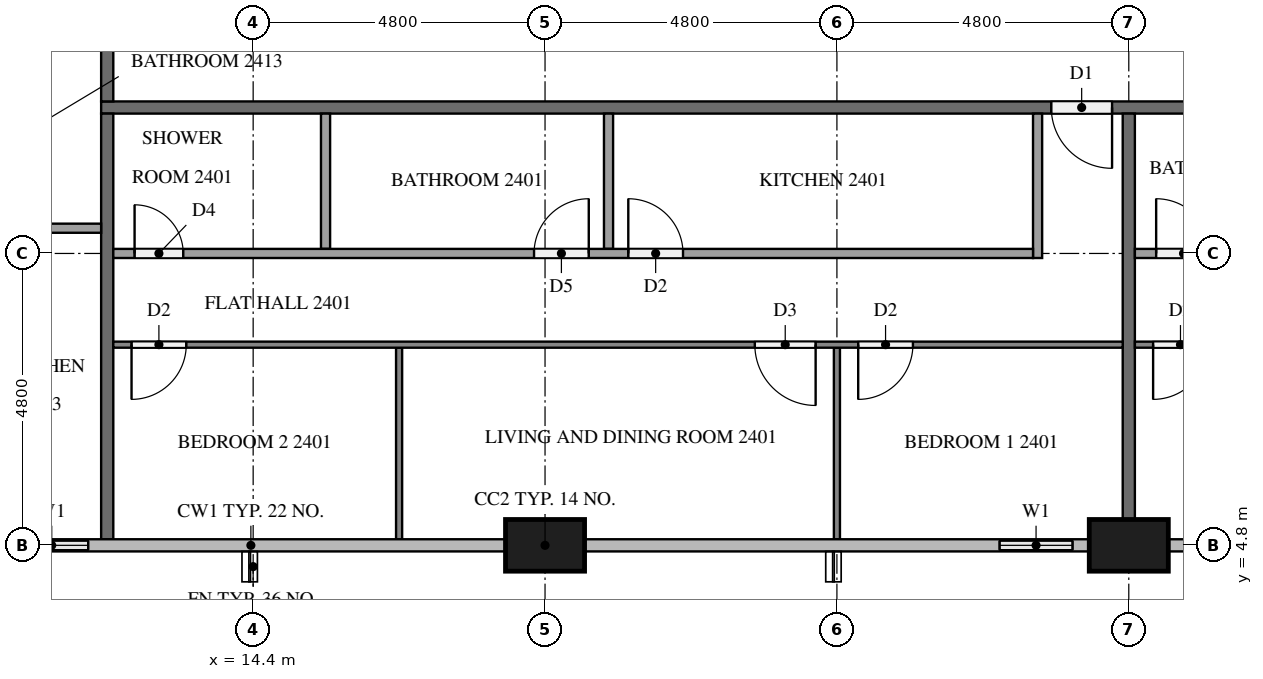
"""IFC4 building model, lengths in metres.
Left out: names, types, materials, properties, quantities, classifications, styles, units other than length and angle.
Written with IfcOpenShell. Run it as: python <this file> out.ifc"""

import sys

from ifc_helpers import new_model, si_unit, direction, frame, frame_2d, origin, origin_2d, place, context, subcontext, project, spatial, rectangle, extrude, element, fill, save


model = new_model("IFC4")
c1 = context("Model", 3, precision=1e-05, world=origin(), true_north=direction((0.0, 1.0)))
c2 = subcontext(c1, "Body", "Model", "MODEL_VIEW")
j1 = project(units=[si_unit("LENGTHUNIT", "METRE"), si_unit("PLANEANGLEUNIT", "RADIAN")], contexts=[c1])
p1 = place(None, origin())
s1 = spatial("IfcSite", under=j1, at=p1, CompositionType="ELEMENT")
p2 = place(p1, origin())
s2 = spatial("IfcBuilding", under=s1, at=p2, CompositionType="ELEMENT")
p3 = place(p2, frame((0.0, 0.0, 96.2)))
s3 = spatial("IfcBuildingStorey", under=s2, at=p3, CompositionType="ELEMENT", Elevation=96.2)
for number, where, z_axis, x_axis in (
    (1, (19.2, 4.8, 0.0), (0.0, 0.0, 1.0), (1.0, 0.0, 0.0)),
    (2, (28.8, 4.8, 0.0), (0.0, 0.0, 1.0), (1.0, 0.0, 0.0)),
):
    element("IfcColumn", number, at=place(p3, frame(where, z_axis=z_axis, x_axis=x_axis)), inside=s3, PredefinedType="COLUMN", context=c2, shape_type="SweptSolid", body=[
        extrude(rectangle(XDim=1.3, YDim=0.85, at=origin_2d()), origin(), (0.0, 0.0, 1.0), 3.2),
    ])
p4 = place(p3, frame((10.175, 4.8, 0.0), z_axis=(0.0, 0.0, 1.0), x_axis=(1.0, 0.0, 0.0)))
e3 = element("IfcWall", 3, at=p4, inside=s3, PredefinedType="SOLIDWALL", context=c2, shape_type="SweptSolid", body=[
    extrude(rectangle(XDim=1.825, YDim=0.15, at=frame_2d((0.913, 0.0))), origin(), (0.0, 0.0, 1.0), 3.2),
])
p5 = place(p4, frame((0.312, 0.0, 0.9)))
e4 = element("IfcOpeningElement", 4, at=p5, cuts=e3, PredefinedType="OPENING", context=c2, shape_type="SweptSolid", body=[
    extrude(rectangle(XDim=1.2, YDim=1.4, at=frame_2d((0.6, 0.7))), frame((0.0, 0.085, 0.0), z_axis=(0.0, -1.0, 0.0), x_axis=(1.0, 0.0, 0.0)), (0.0, 0.0, 1.0), 0.17),
])
p6 = place(p3, frame((26.4, 4.8, 0.0), z_axis=(0.0, 0.0, 1.0), x_axis=(1.0, 0.0, 0.0)))
e5 = element("IfcWall", 5, at=p6, inside=s3, PredefinedType="SOLIDWALL", context=c2, shape_type="SweptSolid", body=[
    extrude(rectangle(XDim=1.75, YDim=0.15, at=frame_2d((0.875, 0.0))), origin(), (0.0, 0.0, 1.0), 3.2),
])
p7 = place(p6, frame((0.275, 0.0, 0.9)))
e6 = element("IfcOpeningElement", 6, at=p7, cuts=e5, PredefinedType="OPENING", context=c2, shape_type="SweptSolid", body=[
    extrude(rectangle(XDim=1.2, YDim=1.4, at=frame_2d((0.6, 0.7))), frame((0.0, 0.085, 0.0), z_axis=(0.0, -1.0, 0.0), x_axis=(1.0, 0.0, 0.0)), (0.0, 0.0, 1.0), 0.17),
])
p8 = place(p3, frame((29.45, 4.8, 0.0), z_axis=(0.0, 0.0, 1.0), x_axis=(1.0, 0.0, 0.0)))
e7 = element("IfcWall", 7, at=p8, inside=s3, PredefinedType="SOLIDWALL", context=c2, shape_type="SweptSolid", body=[
    extrude(rectangle(XDim=1.75, YDim=0.15, at=frame_2d((0.875, 0.0))), origin(), (0.0, 0.0, 1.0), 3.2),
])
p9 = place(p8, frame((0.275, 0.0, 0.9)))
e8 = element("IfcOpeningElement", 8, at=p9, cuts=e7, PredefinedType="OPENING", context=c2, shape_type="SweptSolid", body=[
    extrude(rectangle(XDim=1.2, YDim=1.4, at=frame_2d((0.6, 0.7))), frame((0.0, 0.085, 0.0), z_axis=(0.0, -1.0, 0.0), x_axis=(1.0, 0.0, 0.0)), (0.0, 0.0, 1.0), 0.17),
])
p10 = place(p3, frame((50.5, 12.0, 0.0), z_axis=(0.0, 0.0, 1.0), x_axis=(-1.0, 0.0, 0.0)))
e9 = element("IfcWall", 9, at=p10, inside=s3, PredefinedType="PARTITIONING", context=c2, shape_type="SweptSolid", body=[
    extrude(rectangle(XDim=38.6, YDim=0.2, at=frame_2d((19.3, 0.0))), origin(), (0.0, 0.0, 1.0), 3.2),
])
p11 = place(p10, frame((21.975, 0.0, 0.0)))
e10 = element("IfcOpeningElement", 10, at=p11, cuts=e9, PredefinedType="OPENING", context=c2, shape_type="SweptSolid", body=[
    extrude(rectangle(XDim=1.0, YDim=2.1, at=frame_2d((0.5, 1.05))), frame((0.0, 0.11, 0.0), z_axis=(0.0, -1.0, 0.0), x_axis=(1.0, 0.0, 0.0)), (0.0, 0.0, 1.0), 0.22),
])
p12 = place(p10, frame((7.575, 0.0, 0.0)))
e11 = element("IfcOpeningElement", 11, at=p12, cuts=e9, PredefinedType="OPENING", context=c2, shape_type="SweptSolid", body=[
    extrude(rectangle(XDim=1.0, YDim=2.1, at=frame_2d((0.5, 1.05))), frame((0.0, 0.11, 0.0), z_axis=(0.0, -1.0, 0.0), x_axis=(1.0, 0.0, 0.0)), (0.0, 0.0, 1.0), 0.22),
])
p13 = place(p10, frame((0.375, 0.0, 0.0)))
e12 = element("IfcOpeningElement", 12, at=p13, cuts=e9, PredefinedType="OPENING", context=c2, shape_type="SweptSolid", body=[
    extrude(rectangle(XDim=1.0, YDim=2.1, at=frame_2d((0.5, 1.05))), frame((0.0, 0.11, 0.0), z_axis=(0.0, -1.0, 0.0), x_axis=(1.0, 0.0, 0.0)), (0.0, 0.0, 1.0), 0.22),
])
p14 = place(p3, frame((12.0, 12.1, 0.0), z_axis=(0.0, 0.0, 1.0), x_axis=(0.0, 1.0, 0.0)))
e13 = element("IfcWall", 13, at=p14, inside=s3, PredefinedType="PARTITIONING", context=c2, shape_type="SweptSolid", body=[
    extrude(rectangle(XDim=2.8, YDim=0.2, at=frame_2d((1.4, 0.0))), origin(), (0.0, 0.0, 1.0), 3.2),
])
p15 = place(p14, frame((1.625, 0.0, 0.0)))
e14 = element("IfcOpeningElement", 14, at=p15, cuts=e13, PredefinedType="OPENING", context=c2, shape_type="SweptSolid", body=[
    extrude(rectangle(XDim=1.0, YDim=2.1, at=frame_2d((0.5, 1.05))), frame((0.0, 0.11, 0.0), z_axis=(0.0, -1.0, 0.0), x_axis=(1.0, 0.0, 0.0)), (0.0, 0.0, 1.0), 0.22),
])
p16 = place(p3, frame((28.8, 11.9, 0.0), z_axis=(0.0, 0.0, 1.0), x_axis=(0.0, -1.0, 0.0)))
e15 = element("IfcWall", 15, at=p16, inside=s3, PredefinedType="PARTITIONING", context=c2, shape_type="SweptSolid", body=[
    extrude(rectangle(XDim=6.675, YDim=0.2, at=frame_2d((3.337, 0.0))), origin(), (0.0, 0.0, 1.0), 3.2),
])
p17 = place(p3, frame((12.0, 4.9, 0.0), z_axis=(0.0, 0.0, 1.0), x_axis=(0.0, 1.0, 0.0)))
e16 = element("IfcWall", 16, at=p17, inside=s3, PredefinedType="PARTITIONING", context=c2, shape_type="SweptSolid", body=[
    extrude(rectangle(XDim=7.0, YDim=0.2, at=frame_2d((3.5, 0.0))), origin(), (0.0, 0.0, 1.0), 3.2),
])
for number, where, z_axis, x_axis in (
    (17, (24.0, 8.05, 0.0), (0.0, 0.0, 1.0), (0.0, -1.0, 0.0)),
    (18, (16.8, 8.05, 0.0), (0.0, 0.0, 1.0), (0.0, -1.0, 0.0)),
):
    element("IfcWall", number, at=place(p3, frame(where, z_axis=z_axis, x_axis=x_axis)), inside=s3, PredefinedType="PARTITIONING", context=c2, shape_type="SweptSolid", body=[
        extrude(rectangle(XDim=3.15, YDim=0.1, at=frame_2d((1.575, 0.0))), origin(), (0.0, 0.0, 1.0), 3.2),
    ])
p18 = place(p3, frame((28.7, 8.1, 0.0), z_axis=(0.0, 0.0, 1.0), x_axis=(-1.0, 0.0, 0.0)))
e19 = element("IfcWall", 19, at=p18, inside=s3, PredefinedType="PARTITIONING", context=c2, shape_type="SweptSolid", body=[
    extrude(rectangle(XDim=16.6, YDim=0.1, at=frame_2d((8.3, 0.0))), origin(), (0.0, 0.0, 1.0), 3.2),
])
p19 = place(p18, frame((3.45, 0.0, 0.0)))
e20 = element("IfcOpeningElement", 20, at=p19, cuts=e19, PredefinedType="OPENING", context=c2, shape_type="SweptSolid", body=[
    extrude(rectangle(XDim=0.9, YDim=2.1, at=frame_2d((0.45, 1.05))), frame((0.0, 0.06, 0.0), z_axis=(0.0, -1.0, 0.0), x_axis=(1.0, 0.0, 0.0)), (0.0, 0.0, 1.0), 0.12),
])
p20 = place(p18, frame((5.05, 0.0, 0.0)))
e21 = element("IfcOpeningElement", 21, at=p20, cuts=e19, PredefinedType="OPENING", context=c2, shape_type="SweptSolid", body=[
    extrude(rectangle(XDim=1.0, YDim=2.1, at=frame_2d((0.5, 1.05))), frame((0.0, 0.06, 0.0), z_axis=(0.0, -1.0, 0.0), x_axis=(1.0, 0.0, 0.0)), (0.0, 0.0, 1.0), 0.12),
])
p21 = place(p18, frame((15.4, 0.0, 0.0)))
e22 = element("IfcOpeningElement", 22, at=p21, cuts=e19, PredefinedType="OPENING", context=c2, shape_type="SweptSolid", body=[
    extrude(rectangle(XDim=0.9, YDim=2.1, at=frame_2d((0.45, 1.05))), frame((0.0, 0.06, 0.0), z_axis=(0.0, -1.0, 0.0), x_axis=(1.0, 0.0, 0.0)), (0.0, 0.0, 1.0), 0.12),
])
for number, where, z_axis, x_axis in (
    (23, (20.244, 11.9, 0.0), (0.0, 0.0, 1.0), (0.0, -1.0, 0.0)),
    (24, (15.59, 11.9, 0.0), (0.0, 0.0, 1.0), (0.0, -1.0, 0.0)),
):
    element("IfcWall", number, at=place(p3, frame(where, z_axis=z_axis, x_axis=x_axis)), inside=s3, PredefinedType="PARTITIONING", context=c2, shape_type="SweptSolid", body=[
        extrude(rectangle(XDim=2.225, YDim=0.15, at=frame_2d((1.112, 0.0))), origin(), (0.0, 0.0, 1.0), 3.2),
    ])
p22 = place(p3, frame((27.3, 11.9, 0.0), z_axis=(0.0, 0.0, 1.0), x_axis=(0.0, -1.0, 0.0)))
e25 = element("IfcWall", 25, at=p22, inside=s3, PredefinedType="PARTITIONING", context=c2, shape_type="SweptSolid", body=[
    extrude(rectangle(XDim=2.375, YDim=0.15, at=frame_2d((1.188, 0.0))), origin(), (0.0, 0.0, 1.0), 3.2),
])
p23 = place(p3, frame((12.1, 9.6, 0.0), z_axis=(0.0, 0.0, 1.0), x_axis=(1.0, 0.0, 0.0)))
e26 = element("IfcWall", 26, at=p23, inside=s3, PredefinedType="PARTITIONING", context=c2, shape_type="SweptSolid", body=[
    extrude(rectangle(XDim=15.125, YDim=0.15, at=frame_2d((7.562, 0.0))), origin(), (0.0, 0.0, 1.0), 3.2),
])
p24 = place(p23, frame((8.469, 0.0, 0.0)))
e27 = element("IfcOpeningElement", 27, at=p24, cuts=e26, PredefinedType="OPENING", context=c2, shape_type="SweptSolid", body=[
    extrude(rectangle(XDim=0.9, YDim=2.1, at=frame_2d((0.45, 1.05))), frame((0.0, 0.085, 0.0), z_axis=(0.0, -1.0, 0.0), x_axis=(1.0, 0.0, 0.0)), (0.0, 0.0, 1.0), 0.17),
])
p25 = place(p23, frame((6.919, 0.0, 0.0)))
e28 = element("IfcOpeningElement", 28, at=p25, cuts=e26, PredefinedType="OPENING", context=c2, shape_type="SweptSolid", body=[
    extrude(rectangle(XDim=0.9, YDim=2.1, at=frame_2d((0.45, 1.05))), frame((0.0, 0.085, 0.0), z_axis=(0.0, -1.0, 0.0), x_axis=(1.0, 0.0, 0.0)), (0.0, 0.0, 1.0), 0.17),
])
p26 = place(p23, frame((0.35, 0.0, 0.0)))
e29 = element("IfcOpeningElement", 29, at=p26, cuts=e26, PredefinedType="OPENING", context=c2, shape_type="SweptSolid", body=[
    extrude(rectangle(XDim=0.8, YDim=2.1, at=frame_2d((0.4, 1.05))), frame((0.0, 0.085, 0.0), z_axis=(0.0, -1.0, 0.0), x_axis=(1.0, 0.0, 0.0)), (0.0, 0.0, 1.0), 0.17),
])
p27 = place(p3, frame((43.1, 8.1, 0.0), z_axis=(0.0, 0.0, 1.0), x_axis=(-1.0, 0.0, 0.0)))
e30 = element("IfcWall", 30, at=p27, inside=s3, PredefinedType="PARTITIONING", context=c2, shape_type="SweptSolid", body=[
    extrude(rectangle(XDim=14.2, YDim=0.1, at=frame_2d((7.1, 0.0))), origin(), (0.0, 0.0, 1.0), 3.2),
])
p28 = place(p27, frame((3.35, 0.0, 0.0)))
e31 = element("IfcOpeningElement", 31, at=p28, cuts=e30, PredefinedType="OPENING", context=c2, shape_type="SweptSolid", body=[
    extrude(rectangle(XDim=1.0, YDim=2.1, at=frame_2d((0.5, 1.05))), frame((0.0, 0.06, 0.0), z_axis=(0.0, -1.0, 0.0), x_axis=(1.0, 0.0, 0.0)), (0.0, 0.0, 1.0), 0.12),
])
p29 = place(p27, frame((5.05, 0.0, 0.0)))
e32 = element("IfcOpeningElement", 32, at=p29, cuts=e30, PredefinedType="OPENING", context=c2, shape_type="SweptSolid", body=[
    extrude(rectangle(XDim=0.9, YDim=2.1, at=frame_2d((0.45, 1.05))), frame((0.0, 0.06, 0.0), z_axis=(0.0, -1.0, 0.0), x_axis=(1.0, 0.0, 0.0)), (0.0, 0.0, 1.0), 0.12),
])
p30 = place(p27, frame((13.0, 0.0, 0.0)))
e33 = element("IfcOpeningElement", 33, at=p30, cuts=e30, PredefinedType="OPENING", context=c2, shape_type="SweptSolid", body=[
    extrude(rectangle(XDim=0.9, YDim=2.1, at=frame_2d((0.45, 1.05))), frame((0.0, 0.06, 0.0), z_axis=(0.0, -1.0, 0.0), x_axis=(1.0, 0.0, 0.0)), (0.0, 0.0, 1.0), 0.12),
])
p31 = place(p3, frame((28.9, 9.6, 0.0), z_axis=(0.0, 0.0, 1.0), x_axis=(1.0, 0.0, 0.0)))
e34 = element("IfcWall", 34, at=p31, inside=s3, PredefinedType="PARTITIONING", context=c2, shape_type="SweptSolid", body=[
    extrude(rectangle(XDim=12.725, YDim=0.15, at=frame_2d((6.363, 0.0))), origin(), (0.0, 0.0, 1.0), 3.2),
])
p32 = place(p31, frame((10.114, 0.0, 0.0)))
e35 = element("IfcOpeningElement", 35, at=p32, cuts=e34, PredefinedType="OPENING", context=c2, shape_type="SweptSolid", body=[
    extrude(rectangle(XDim=0.8, YDim=2.1, at=frame_2d((0.4, 1.05))), frame((0.0, 0.085, 0.0), z_axis=(0.0, -1.0, 0.0), x_axis=(1.0, 0.0, 0.0)), (0.0, 0.0, 1.0), 0.17),
])
p33 = place(p31, frame((8.563, 0.0, 0.0)))
e36 = element("IfcOpeningElement", 36, at=p33, cuts=e34, PredefinedType="OPENING", context=c2, shape_type="SweptSolid", body=[
    extrude(rectangle(XDim=0.9, YDim=2.1, at=frame_2d((0.45, 1.05))), frame((0.0, 0.085, 0.0), z_axis=(0.0, -1.0, 0.0), x_axis=(1.0, 0.0, 0.0)), (0.0, 0.0, 1.0), 0.17),
])
p34 = place(p31, frame((0.35, 0.0, 0.0)))
e37 = element("IfcOpeningElement", 37, at=p34, cuts=e34, PredefinedType="OPENING", context=c2, shape_type="SweptSolid", body=[
    extrude(rectangle(XDim=0.9, YDim=2.1, at=frame_2d((0.45, 1.05))), frame((0.0, 0.085, 0.0), z_axis=(0.0, -1.0, 0.0), x_axis=(1.0, 0.0, 0.0)), (0.0, 0.0, 1.0), 0.17),
])
p35 = place(p3, frame((11.9, 10.015, 0.0), z_axis=(0.0, 0.0, 1.0), x_axis=(-1.0, 0.0, 0.0)))
e38 = element("IfcWall", 38, at=p35, inside=s3, PredefinedType="PARTITIONING", context=c2, shape_type="SweptSolid", body=[
    extrude(rectangle(XDim=1.925, YDim=0.15, at=frame_2d((0.962, 0.0))), origin(), (0.0, 0.0, 1.0), 3.2),
])
p36 = place(p5, origin())
e39 = element("IfcWindow", 39, at=p36, inside=s3, PartitioningType="SINGLE_PANEL", PredefinedType="WINDOW", context=c2, shape_type="SweptSolid", body=[
    extrude(rectangle(XDim=1.2, YDim=1.4, at=frame_2d((0.6, 0.7))), frame((0.0, 0.03, 0.0), z_axis=(0.0, -1.0, 0.0), x_axis=(1.0, 0.0, 0.0)), (0.0, 0.0, 1.0), 0.06),
])
fill(e4, e39)
p37 = place(p7, origin())
e40 = element("IfcWindow", 40, at=p37, inside=s3, PartitioningType="SINGLE_PANEL", PredefinedType="WINDOW", context=c2, shape_type="SweptSolid", body=[
    extrude(rectangle(XDim=1.2, YDim=1.4, at=frame_2d((0.6, 0.7))), frame((0.0, 0.03, 0.0), z_axis=(0.0, -1.0, 0.0), x_axis=(1.0, 0.0, 0.0)), (0.0, 0.0, 1.0), 0.06),
])
fill(e6, e40)
p38 = place(p11, origin())
e41 = element("IfcDoor", 41, at=p38, inside=s3, OperationType="SINGLE_SWING_LEFT", PredefinedType="DOOR", context=c2, shape_type="SweptSolid", body=[
    extrude(rectangle(XDim=1.0, YDim=2.1, at=frame_2d((0.5, 1.05))), frame((0.0, 0.025, 0.0), z_axis=(0.0, -1.0, 0.0), x_axis=(1.0, 0.0, 0.0)), (0.0, 0.0, 1.0), 0.05),
])
fill(e10, e41)
p39 = place(p19, origin())
e42 = element("IfcDoor", 42, at=p39, inside=s3, OperationType="SINGLE_SWING_RIGHT", PredefinedType="DOOR", context=c2, shape_type="SweptSolid", body=[
    extrude(rectangle(XDim=0.9, YDim=2.1, at=frame_2d((0.45, 1.05))), frame((0.0, 0.025, 0.0), z_axis=(0.0, -1.0, 0.0), x_axis=(1.0, 0.0, 0.0)), (0.0, 0.0, 1.0), 0.05),
])
fill(e20, e42)
p40 = place(p20, origin())
e43 = element("IfcDoor", 43, at=p40, inside=s3, OperationType="SINGLE_SWING_LEFT", PredefinedType="DOOR", context=c2, shape_type="SweptSolid", body=[
    extrude(rectangle(XDim=1.0, YDim=2.1, at=frame_2d((0.5, 1.05))), frame((0.0, 0.025, 0.0), z_axis=(0.0, -1.0, 0.0), x_axis=(1.0, 0.0, 0.0)), (0.0, 0.0, 1.0), 0.05),
])
fill(e21, e43)
p41 = place(p21, origin())
e44 = element("IfcDoor", 44, at=p41, inside=s3, OperationType="SINGLE_SWING_RIGHT", PredefinedType="DOOR", context=c2, shape_type="SweptSolid", body=[
    extrude(rectangle(XDim=0.9, YDim=2.1, at=frame_2d((0.45, 1.05))), frame((0.0, 0.025, 0.0), z_axis=(0.0, -1.0, 0.0), x_axis=(1.0, 0.0, 0.0)), (0.0, 0.0, 1.0), 0.05),
])
fill(e22, e44)
p42 = place(p24, origin())
e45 = element("IfcDoor", 45, at=p42, inside=s3, OperationType="SINGLE_SWING_LEFT", PredefinedType="DOOR", context=c2, shape_type="SweptSolid", body=[
    extrude(rectangle(XDim=0.9, YDim=2.1, at=frame_2d((0.45, 1.05))), frame((0.0, 0.025, 0.0), z_axis=(0.0, -1.0, 0.0), x_axis=(1.0, 0.0, 0.0)), (0.0, 0.0, 1.0), 0.05),
])
fill(e27, e45)
p43 = place(p25, origin())
e46 = element("IfcDoor", 46, at=p43, inside=s3, OperationType="SINGLE_SWING_RIGHT", PredefinedType="DOOR", context=c2, shape_type="SweptSolid", body=[
    extrude(rectangle(XDim=0.9, YDim=2.1, at=frame_2d((0.45, 1.05))), frame((0.0, 0.025, 0.0), z_axis=(0.0, -1.0, 0.0), x_axis=(1.0, 0.0, 0.0)), (0.0, 0.0, 1.0), 0.05),
])
fill(e28, e46)
p44 = place(p26, origin())
e47 = element("IfcDoor", 47, at=p44, inside=s3, OperationType="SINGLE_SWING_LEFT", PredefinedType="DOOR", context=c2, shape_type="SweptSolid", body=[
    extrude(rectangle(XDim=0.8, YDim=2.1, at=frame_2d((0.4, 1.05))), frame((0.0, 0.025, 0.0), z_axis=(0.0, -1.0, 0.0), x_axis=(1.0, 0.0, 0.0)), (0.0, 0.0, 1.0), 0.05),
])
fill(e29, e47)
p45 = place(p30, origin())
e48 = element("IfcDoor", 48, at=p45, inside=s3, OperationType="SINGLE_SWING_RIGHT", PredefinedType="DOOR", context=c2, shape_type="SweptSolid", body=[
    extrude(rectangle(XDim=0.9, YDim=2.1, at=frame_2d((0.45, 1.05))), frame((0.0, 0.025, 0.0), z_axis=(0.0, -1.0, 0.0), x_axis=(1.0, 0.0, 0.0)), (0.0, 0.0, 1.0), 0.05),
])
fill(e33, e48)
p46 = place(p34, origin())
e49 = element("IfcDoor", 49, at=p46, inside=s3, OperationType="SINGLE_SWING_LEFT", PredefinedType="DOOR", context=c2, shape_type="SweptSolid", body=[
    extrude(rectangle(XDim=0.9, YDim=2.1, at=frame_2d((0.45, 1.05))), frame((0.0, 0.025, 0.0), z_axis=(0.0, -1.0, 0.0), x_axis=(1.0, 0.0, 0.0)), (0.0, 0.0, 1.0), 0.05),
])
fill(e37, e49)
save(model, sys.argv[1])
